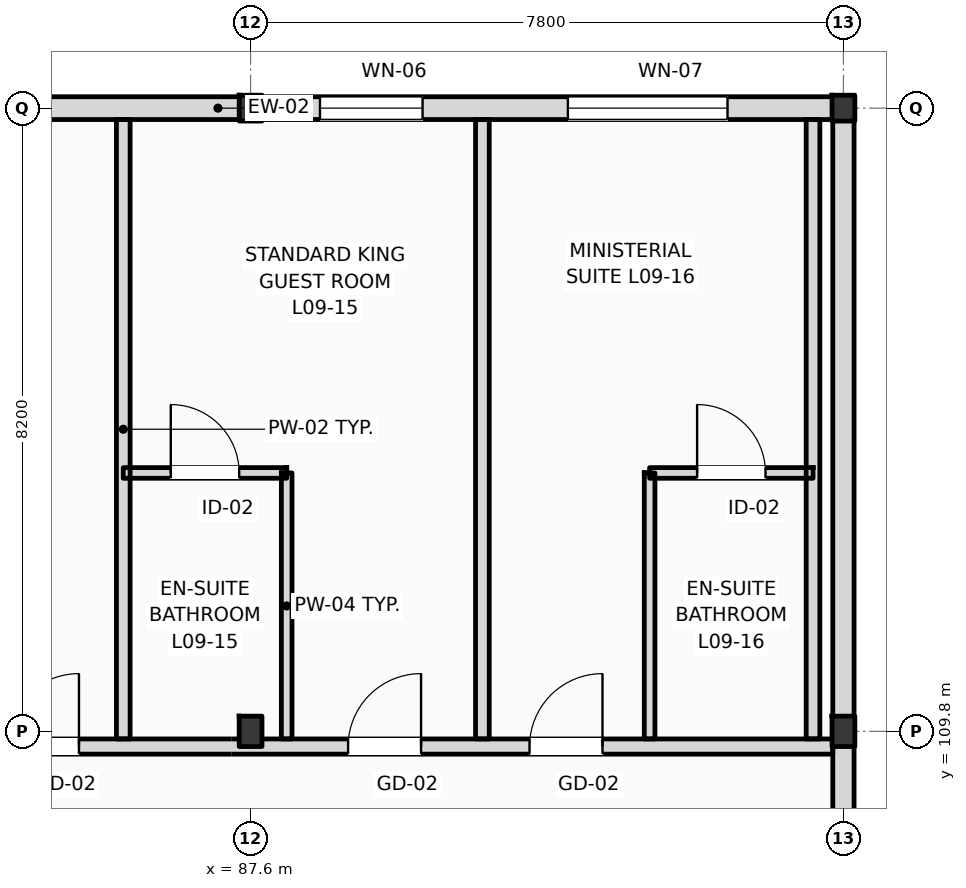
"""IFC4 building model, lengths in metres.
Left out: names, types, materials, properties, quantities, classifications, styles, units other than length and angle.
Written with IfcOpenShell. Run it as: python <this file> out.ifc"""

import sys

from ifc_helpers import new_model, si_unit, direction, frame, frame_2d, origin, origin_2d, place, context, subcontext, project, spatial, rectangle, i_section, extrude, element, fill, save


model = new_model("IFC4")
c1 = context("Model", 3, precision=1e-05, world=origin(), true_north=direction((0.0, 1.0)))
c2 = subcontext(c1, "Body", "Model", "MODEL_VIEW")
j1 = project(units=[si_unit("LENGTHUNIT", "METRE"), si_unit("PLANEANGLEUNIT", "RADIAN")], contexts=[c1])
p1 = place(None, origin())
s1 = spatial("IfcSite", under=j1, at=p1, CompositionType="ELEMENT")
p2 = place(p1, origin())
s2 = spatial("IfcBuilding", under=s1, at=p2, CompositionType="ELEMENT")
p3 = place(p2, frame((0.0, 0.0, 39.0)))
s3 = spatial("IfcBuildingStorey", under=s2, at=p3, CompositionType="ELEMENT", Elevation=39.0)
p4 = place(p3, frame((87.6, 109.8, 0.0), z_axis=(0.0, 0.0, 1.0), x_axis=(1.0, 0.0, 0.0)))
e1 = element("IfcColumn", 1, at=p4, inside=s3, PredefinedType="COLUMN", context=c2, shape_type="SweptSolid", body=[
    extrude(i_section(OverallWidth=0.3, OverallDepth=0.4, WebThickness=0.013, FlangeThickness=0.024, FilletRadius=0.027, at=origin_2d()), origin(), (0.0, 0.0, 1.0), 3.6),
])
p5 = place(p3, frame((87.6, 118.0, 0.0), z_axis=(0.0, 0.0, 1.0), x_axis=(1.0, 0.0, 0.0)))
e2 = element("IfcColumn", 2, at=p5, inside=s3, PredefinedType="COLUMN", context=c2, shape_type="SweptSolid", body=[
    extrude(i_section(OverallWidth=0.3, OverallDepth=0.34, WebThickness=0.012, FlangeThickness=0.021, FilletRadius=0.027, at=origin_2d()), origin(), (0.0, 0.0, 1.0), 3.6),
])
p6 = place(p3, frame((95.4, 109.8, 0.0), z_axis=(0.0, 0.0, 1.0), x_axis=(1.0, 0.0, 0.0)))
e3 = element("IfcColumn", 3, at=p6, inside=s3, PredefinedType="COLUMN", context=c2, shape_type="SweptSolid", body=[
    extrude(i_section(OverallWidth=0.3, OverallDepth=0.4, WebThickness=0.013, FlangeThickness=0.024, FilletRadius=0.027, at=origin_2d()), origin(), (0.0, 0.0, 1.0), 3.6),
])
p7 = place(p3, frame((95.4, 118.0, 0.0), z_axis=(0.0, 0.0, 1.0), x_axis=(1.0, 0.0, 0.0)))
e4 = element("IfcColumn", 4, at=p7, inside=s3, PredefinedType="COLUMN", context=c2, shape_type="SweptSolid", body=[
    extrude(i_section(OverallWidth=0.3, OverallDepth=0.34, WebThickness=0.012, FlangeThickness=0.021, FilletRadius=0.027, at=origin_2d()), origin(), (0.0, 0.0, 1.0), 3.6),
])
p8 = place(p3, frame((22.5, 118.0, 0.0), z_axis=(0.0, 0.0, 1.0), x_axis=(1.0, 0.0, 0.0)))
e5 = element("IfcWall", 5, at=p8, inside=s3, PredefinedType="STANDARD", context=c2, shape_type="SweptSolid", body=[
    extrude(rectangle(XDim=72.9, YDim=0.3, at=frame_2d((36.45, 0.0))), origin(), (0.0, 0.0, 1.0), 2.92),
])
p9 = place(p8, frame((3.6, 0.0, 0.9)))
e6 = element("IfcOpeningElement", 6, at=p9, cuts=e5, PredefinedType="OPENING", context=c2, shape_type="SweptSolid", body=[
    extrude(rectangle(XDim=1.1, YDim=1.6, at=frame_2d((0.55, 0.8))), frame((0.0, 0.16, 0.0), z_axis=(0.0, -1.0, 0.0), x_axis=(1.0, 0.0, 0.0)), (0.0, 0.0, 1.0), 0.32),
])
p10 = place(p8, frame((6.688, 0.0, 0.0)))
e7 = element("IfcOpeningElement", 7, at=p10, cuts=e5, PredefinedType="OPENING", context=c2, shape_type="SweptSolid", body=[
    extrude(rectangle(XDim=1.2, YDim=2.25, at=frame_2d((0.6, 1.125))), frame((0.0, 0.16, 0.0), z_axis=(0.0, -1.0, 0.0), x_axis=(1.0, 0.0, 0.0)), (0.0, 0.0, 1.0), 0.32),
])
p11 = place(p8, frame((11.388, 0.0, 0.9)))
e8 = element("IfcOpeningElement", 8, at=p11, cuts=e5, PredefinedType="OPENING", context=c2, shape_type="SweptSolid", body=[
    extrude(rectangle(XDim=1.6, YDim=1.75, at=frame_2d((0.8, 0.875))), frame((0.0, 0.16, 0.0), z_axis=(0.0, -1.0, 0.0), x_axis=(1.0, 0.0, 0.0)), (0.0, 0.0, 1.0), 0.32),
])
p12 = place(p8, frame((15.413, 0.0, 0.9)))
e9 = element("IfcOpeningElement", 9, at=p12, cuts=e5, PredefinedType="OPENING", context=c2, shape_type="SweptSolid", body=[
    extrude(rectangle(XDim=1.75, YDim=1.84, at=frame_2d((0.875, 0.92))), frame((0.0, 0.16, 0.0), z_axis=(0.0, -1.0, 0.0), x_axis=(1.0, 0.0, 0.0)), (0.0, 0.0, 1.0), 0.32),
])
p13 = place(p8, frame((21.245, 0.0, 0.0)))
e10 = element("IfcOpeningElement", 10, at=p13, cuts=e5, PredefinedType="OPENING", context=c2, shape_type="SweptSolid", body=[
    extrude(rectangle(XDim=1.2, YDim=2.25, at=frame_2d((0.6, 1.125))), frame((0.0, 0.16, 0.0), z_axis=(0.0, -1.0, 0.0), x_axis=(1.0, 0.0, 0.0)), (0.0, 0.0, 1.0), 0.32),
])
p14 = place(p8, frame((23.705, 0.0, 0.0)))
e11 = element("IfcOpeningElement", 11, at=p14, cuts=e5, PredefinedType="OPENING", context=c2, shape_type="SweptSolid", body=[
    extrude(rectangle(XDim=1.2, YDim=2.25, at=frame_2d((0.6, 1.125))), frame((0.0, 0.16, 0.0), z_axis=(0.0, -1.0, 0.0), x_axis=(1.0, 0.0, 0.0)), (0.0, 0.0, 1.0), 0.32),
])
p15 = place(p8, frame((28.488, 0.0, 0.9)))
e12 = element("IfcOpeningElement", 12, at=p15, cuts=e5, PredefinedType="OPENING", context=c2, shape_type="SweptSolid", body=[
    extrude(rectangle(XDim=2.6, YDim=1.84, at=frame_2d((1.3, 0.92))), frame((0.0, 0.16, 0.0), z_axis=(0.0, -1.0, 0.0), x_axis=(1.0, 0.0, 0.0)), (0.0, 0.0, 1.0), 0.32),
])
p16 = place(p8, frame((34.76, 0.0, 0.9)))
e13 = element("IfcOpeningElement", 13, at=p16, cuts=e5, PredefinedType="OPENING", context=c2, shape_type="SweptSolid", body=[
    extrude(rectangle(XDim=1.1, YDim=1.84, at=frame_2d((0.55, 0.92))), frame((0.0, 0.16, 0.0), z_axis=(0.0, -1.0, 0.0), x_axis=(1.0, 0.0, 0.0)), (0.0, 0.0, 1.0), 0.32),
])
p17 = place(p8, frame((38.143, 0.0, 0.0)))
e14 = element("IfcOpeningElement", 14, at=p17, cuts=e5, PredefinedType="OPENING", context=c2, shape_type="SweptSolid", body=[
    extrude(rectangle(XDim=1.2, YDim=2.25, at=frame_2d((0.6, 1.125))), frame((0.0, 0.16, 0.0), z_axis=(0.0, -1.0, 0.0), x_axis=(1.0, 0.0, 0.0)), (0.0, 0.0, 1.0), 0.32),
])
p18 = place(p8, frame((42.687, 0.0, 0.9)))
e15 = element("IfcOpeningElement", 15, at=p18, cuts=e5, PredefinedType="OPENING", context=c2, shape_type="SweptSolid", body=[
    extrude(rectangle(XDim=1.2, YDim=1.8, at=frame_2d((0.6, 0.9))), frame((0.0, 0.16, 0.0), z_axis=(0.0, -1.0, 0.0), x_axis=(1.0, 0.0, 0.0)), (0.0, 0.0, 1.0), 0.32),
])
p19 = place(p8, frame((47.112, 0.0, 0.9)))
e16 = element("IfcOpeningElement", 16, at=p19, cuts=e5, PredefinedType="OPENING", context=c2, shape_type="SweptSolid", body=[
    extrude(rectangle(XDim=1.35, YDim=1.84, at=frame_2d((0.675, 0.92))), frame((0.0, 0.16, 0.0), z_axis=(0.0, -1.0, 0.0), x_axis=(1.0, 0.0, 0.0)), (0.0, 0.0, 1.0), 0.32),
])
p20 = place(p8, frame((52.482, 0.0, 0.0)))
e17 = element("IfcOpeningElement", 17, at=p20, cuts=e5, PredefinedType="OPENING", context=c2, shape_type="SweptSolid", body=[
    extrude(rectangle(XDim=1.2, YDim=2.25, at=frame_2d((0.6, 1.125))), frame((0.0, 0.16, 0.0), z_axis=(0.0, -1.0, 0.0), x_axis=(1.0, 0.0, 0.0)), (0.0, 0.0, 1.0), 0.32),
])
p21 = place(p8, frame((54.942, 0.0, 0.0)))
e18 = element("IfcOpeningElement", 18, at=p21, cuts=e5, PredefinedType="OPENING", context=c2, shape_type="SweptSolid", body=[
    extrude(rectangle(XDim=1.2, YDim=2.25, at=frame_2d((0.6, 1.125))), frame((0.0, 0.16, 0.0), z_axis=(0.0, -1.0, 0.0), x_axis=(1.0, 0.0, 0.0)), (0.0, 0.0, 1.0), 0.32),
])
p22 = place(p8, frame((60.387, 0.0, 0.9)))
e19 = element("IfcOpeningElement", 19, at=p22, cuts=e5, PredefinedType="OPENING", context=c2, shape_type="SweptSolid", body=[
    extrude(rectangle(XDim=1.8, YDim=1.84, at=frame_2d((0.9, 0.92))), frame((0.0, 0.16, 0.0), z_axis=(0.0, -1.0, 0.0), x_axis=(1.0, 0.0, 0.0)), (0.0, 0.0, 1.0), 0.32),
])
p23 = place(p8, frame((66.013, 0.0, 0.9)))
e20 = element("IfcOpeningElement", 20, at=p23, cuts=e5, PredefinedType="OPENING", context=c2, shape_type="SweptSolid", body=[
    extrude(rectangle(XDim=1.35, YDim=1.84, at=frame_2d((0.675, 0.92))), frame((0.0, 0.16, 0.0), z_axis=(0.0, -1.0, 0.0), x_axis=(1.0, 0.0, 0.0)), (0.0, 0.0, 1.0), 0.32),
])
p24 = place(p8, frame((69.275, 0.0, 0.9)))
e21 = element("IfcOpeningElement", 21, at=p24, cuts=e5, PredefinedType="OPENING", context=c2, shape_type="SweptSolid", body=[
    extrude(rectangle(XDim=2.1, YDim=1.84, at=frame_2d((1.05, 0.92))), frame((0.0, 0.16, 0.0), z_axis=(0.0, -1.0, 0.0), x_axis=(1.0, 0.0, 0.0)), (0.0, 0.0, 1.0), 0.32),
])
p25 = place(p3, frame((95.4, 96.0, 0.0), z_axis=(0.0, 0.0, 1.0), x_axis=(0.0, 1.0, 0.0)))
e22 = element("IfcWall", 22, at=p25, inside=s3, PredefinedType="STANDARD", context=c2, shape_type="SweptSolid", body=[
    extrude(rectangle(XDim=22.0, YDim=0.28, at=frame_2d((11.0, 0.0))), origin(), (0.0, 0.0, 1.0), 3.01),
])
p26 = place(p3, frame((10.65, 109.6, 0.0), z_axis=(0.0, 0.0, 1.0), x_axis=(1.0, 0.0, 0.0)))
e23 = element("IfcWall", 23, at=p26, inside=s3, PredefinedType="PARTITIONING", context=c2, shape_type="SweptSolid", body=[
    extrude(rectangle(XDim=84.61, YDim=0.2, at=frame_2d((42.305, 0.0))), origin(), (0.0, 0.0, 1.0), 2.82),
])
p27 = place(p26, frame((15.49, 0.0, 0.0)))
e24 = element("IfcOpeningElement", 24, at=p27, cuts=e23, PredefinedType="OPENING", context=c2, shape_type="SweptSolid", body=[
    extrude(rectangle(XDim=1.02, YDim=2.2, at=frame_2d((0.51, 1.1))), frame((0.0, 0.11, 0.0), z_axis=(0.0, -1.0, 0.0), x_axis=(1.0, 0.0, 0.0)), (0.0, 0.0, 1.0), 0.22),
])
p28 = place(p26, frame((19.703, 0.0, 0.0)))
e25 = element("IfcOpeningElement", 25, at=p28, cuts=e23, PredefinedType="OPENING", context=c2, shape_type="SweptSolid", body=[
    extrude(rectangle(XDim=1.02, YDim=2.2, at=frame_2d((0.51, 1.1))), frame((0.0, 0.11, 0.0), z_axis=(0.0, -1.0, 0.0), x_axis=(1.0, 0.0, 0.0)), (0.0, 0.0, 1.0), 0.22),
])
p29 = place(p26, frame((24.203, 0.0, 0.0)))
e26 = element("IfcOpeningElement", 26, at=p29, cuts=e23, PredefinedType="OPENING", context=c2, shape_type="SweptSolid", body=[
    extrude(rectangle(XDim=1.02, YDim=2.2, at=frame_2d((0.51, 1.1))), frame((0.0, 0.11, 0.0), z_axis=(0.0, -1.0, 0.0), x_axis=(1.0, 0.0, 0.0)), (0.0, 0.0, 1.0), 0.22),
])
p30 = place(p26, frame((26.552, 0.0, 0.0)))
e27 = element("IfcOpeningElement", 27, at=p30, cuts=e23, PredefinedType="OPENING", context=c2, shape_type="SweptSolid", body=[
    extrude(rectangle(XDim=1.02, YDim=2.2, at=frame_2d((0.51, 1.1))), frame((0.0, 0.11, 0.0), z_axis=(0.0, -1.0, 0.0), x_axis=(1.0, 0.0, 0.0)), (0.0, 0.0, 1.0), 0.22),
])
p31 = place(p26, frame((33.233, 0.0, 0.0)))
e28 = element("IfcOpeningElement", 28, at=p31, cuts=e23, PredefinedType="OPENING", context=c2, shape_type="SweptSolid", body=[
    extrude(rectangle(XDim=0.96, YDim=2.2, at=frame_2d((0.48, 1.1))), frame((0.0, 0.11, 0.0), z_axis=(0.0, -1.0, 0.0), x_axis=(1.0, 0.0, 0.0)), (0.0, 0.0, 1.0), 0.22),
])
p32 = place(p26, frame((35.583, 0.0, 0.0)))
e29 = element("IfcOpeningElement", 29, at=p32, cuts=e23, PredefinedType="OPENING", context=c2, shape_type="SweptSolid", body=[
    extrude(rectangle(XDim=0.96, YDim=2.2, at=frame_2d((0.48, 1.1))), frame((0.0, 0.11, 0.0), z_axis=(0.0, -1.0, 0.0), x_axis=(1.0, 0.0, 0.0)), (0.0, 0.0, 1.0), 0.22),
])
p33 = place(p26, frame((42.233, 0.0, 0.0)))
e30 = element("IfcOpeningElement", 30, at=p33, cuts=e23, PredefinedType="OPENING", context=c2, shape_type="SweptSolid", body=[
    extrude(rectangle(XDim=0.96, YDim=2.2, at=frame_2d((0.48, 1.1))), frame((0.0, 0.11, 0.0), z_axis=(0.0, -1.0, 0.0), x_axis=(1.0, 0.0, 0.0)), (0.0, 0.0, 1.0), 0.22),
])
p34 = place(p26, frame((46.983, 0.0, 0.0)))
e31 = element("IfcOpeningElement", 31, at=p34, cuts=e23, PredefinedType="OPENING", context=c2, shape_type="SweptSolid", body=[
    extrude(rectangle(XDim=0.96, YDim=2.2, at=frame_2d((0.48, 1.1))), frame((0.0, 0.11, 0.0), z_axis=(0.0, -1.0, 0.0), x_axis=(1.0, 0.0, 0.0)), (0.0, 0.0, 1.0), 0.22),
])
p35 = place(p26, frame((51.233, 0.0, 0.0)))
e32 = element("IfcOpeningElement", 32, at=p35, cuts=e23, PredefinedType="OPENING", context=c2, shape_type="SweptSolid", body=[
    extrude(rectangle(XDim=0.96, YDim=2.2, at=frame_2d((0.48, 1.1))), frame((0.0, 0.11, 0.0), z_axis=(0.0, -1.0, 0.0), x_axis=(1.0, 0.0, 0.0)), (0.0, 0.0, 1.0), 0.22),
])
p36 = place(p26, frame((55.733, 0.0, 0.0)))
e33 = element("IfcOpeningElement", 33, at=p36, cuts=e23, PredefinedType="OPENING", context=c2, shape_type="SweptSolid", body=[
    extrude(rectangle(XDim=0.96, YDim=2.2, at=frame_2d((0.48, 1.1))), frame((0.0, 0.11, 0.0), z_axis=(0.0, -1.0, 0.0), x_axis=(1.0, 0.0, 0.0)), (0.0, 0.0, 1.0), 0.22),
])
p37 = place(p26, frame((58.083, 0.0, 0.0)))
e34 = element("IfcOpeningElement", 34, at=p37, cuts=e23, PredefinedType="OPENING", context=c2, shape_type="SweptSolid", body=[
    extrude(rectangle(XDim=0.96, YDim=2.2, at=frame_2d((0.48, 1.1))), frame((0.0, 0.11, 0.0), z_axis=(0.0, -1.0, 0.0), x_axis=(1.0, 0.0, 0.0)), (0.0, 0.0, 1.0), 0.22),
])
p38 = place(p26, frame((64.732, 0.0, 0.0)))
e35 = element("IfcOpeningElement", 35, at=p38, cuts=e23, PredefinedType="OPENING", context=c2, shape_type="SweptSolid", body=[
    extrude(rectangle(XDim=0.96, YDim=2.2, at=frame_2d((0.48, 1.1))), frame((0.0, 0.11, 0.0), z_axis=(0.0, -1.0, 0.0), x_axis=(1.0, 0.0, 0.0)), (0.0, 0.0, 1.0), 0.22),
])
p39 = place(p26, frame((66.832, 0.0, 0.0)))
e36 = element("IfcOpeningElement", 36, at=p39, cuts=e23, PredefinedType="OPENING", context=c2, shape_type="SweptSolid", body=[
    extrude(rectangle(XDim=0.96, YDim=2.2, at=frame_2d((0.48, 1.1))), frame((0.0, 0.11, 0.0), z_axis=(0.0, -1.0, 0.0), x_axis=(1.0, 0.0, 0.0)), (0.0, 0.0, 1.0), 0.22),
])
p40 = place(p26, frame((73.732, 0.0, 0.0)))
e37 = element("IfcOpeningElement", 37, at=p40, cuts=e23, PredefinedType="OPENING", context=c2, shape_type="SweptSolid", body=[
    extrude(rectangle(XDim=0.96, YDim=2.2, at=frame_2d((0.48, 1.1))), frame((0.0, 0.11, 0.0), z_axis=(0.0, -1.0, 0.0), x_axis=(1.0, 0.0, 0.0)), (0.0, 0.0, 1.0), 0.22),
])
p41 = place(p26, frame((78.233, 0.0, 0.0)))
e38 = element("IfcOpeningElement", 38, at=p41, cuts=e23, PredefinedType="OPENING", context=c2, shape_type="SweptSolid", body=[
    extrude(rectangle(XDim=0.96, YDim=2.2, at=frame_2d((0.48, 1.1))), frame((0.0, 0.11, 0.0), z_axis=(0.0, -1.0, 0.0), x_axis=(1.0, 0.0, 0.0)), (0.0, 0.0, 1.0), 0.22),
])
p42 = place(p26, frame((80.62, 0.0, 0.0)))
e39 = element("IfcOpeningElement", 39, at=p42, cuts=e23, PredefinedType="OPENING", context=c2, shape_type="SweptSolid", body=[
    extrude(rectangle(XDim=0.96, YDim=2.2, at=frame_2d((0.48, 1.1))), frame((0.0, 0.11, 0.0), z_axis=(0.0, -1.0, 0.0), x_axis=(1.0, 0.0, 0.0)), (0.0, 0.0, 1.0), 0.22),
])
p43 = place(p26, frame((2.716, 0.0, 0.0)))
e40 = element("IfcOpeningElement", 40, at=p43, cuts=e23, PredefinedType="OPENING", context=c2, shape_type="SweptSolid", body=[
    extrude(rectangle(XDim=1.35, YDim=2.25, at=frame_2d((0.675, 1.125))), frame((0.0, 0.11, 0.0), z_axis=(0.0, -1.0, 0.0), x_axis=(1.0, 0.0, 0.0)), (0.0, 0.0, 1.0), 0.22),
])
p44 = place(p26, frame((6.65, 0.0, 0.0)))
e41 = element("IfcOpeningElement", 41, at=p44, cuts=e23, PredefinedType="OPENING", context=c2, shape_type="SweptSolid", body=[
    extrude(rectangle(XDim=1.35, YDim=2.25, at=frame_2d((0.675, 1.125))), frame((0.0, 0.11, 0.0), z_axis=(0.0, -1.0, 0.0), x_axis=(1.0, 0.0, 0.0)), (0.0, 0.0, 1.0), 0.22),
])
p45 = place(p26, frame((10.583, 0.0, 0.0)))
e42 = element("IfcOpeningElement", 42, at=p45, cuts=e23, PredefinedType="OPENING", context=c2, shape_type="SweptSolid", body=[
    extrude(rectangle(XDim=1.35, YDim=2.25, at=frame_2d((0.675, 1.125))), frame((0.0, 0.11, 0.0), z_axis=(0.0, -1.0, 0.0), x_axis=(1.0, 0.0, 0.0)), (0.0, 0.0, 1.0), 0.22),
])
for number, where, z_axis, x_axis in (
    (43, (85.925, 109.7, 0.0), (0.0, 0.0, 1.0), (0.0, 1.0, 0.0)),
    (44, (90.65, 109.7, 0.0), (0.0, 0.0, 1.0), (0.0, 1.0, 0.0)),
):
    element("IfcWall", number, at=place(p3, frame(where, z_axis=z_axis, x_axis=x_axis)), inside=s3, PredefinedType="PARTITIONING", context=c2, shape_type="SweptSolid", body=[
        extrude(rectangle(XDim=8.15, YDim=0.18, at=frame_2d((4.075, 0.0))), origin(), (0.0, 0.0, 1.0), 3.38),
    ])
p46 = place(p3, frame((88.075, 109.7, 0.0), z_axis=(0.0, 0.0, 1.0), x_axis=(0.0, 1.0, 0.0)))
e45 = element("IfcWall", 45, at=p46, inside=s3, PredefinedType="PARTITIONING", context=c2, shape_type="SweptSolid", body=[
    extrude(rectangle(XDim=3.5, YDim=0.14, at=frame_2d((1.75, 0.0))), origin(), (0.0, 0.0, 1.0), 3.38),
])
p47 = place(p3, frame((85.925, 113.2, 0.0), z_axis=(0.0, 0.0, 1.0), x_axis=(1.0, 0.0, 0.0)))
e46 = element("IfcWall", 46, at=p47, inside=s3, PredefinedType="PARTITIONING", context=c2, shape_type="SweptSolid", body=[
    extrude(rectangle(XDim=2.15, YDim=0.14, at=frame_2d((1.075, 0.0))), origin(), (0.0, 0.0, 1.0), 3.38),
])
p48 = place(p47, frame((0.625, 0.0, 0.0)))
e47 = element("IfcOpeningElement", 47, at=p48, cuts=e46, PredefinedType="OPENING", context=c2, shape_type="SweptSolid", body=[
    extrude(rectangle(XDim=0.9, YDim=2.1, at=frame_2d((0.45, 1.05))), frame((0.0, 0.08, 0.0), z_axis=(0.0, -1.0, 0.0), x_axis=(1.0, 0.0, 0.0)), (0.0, 0.0, 1.0), 0.16),
])
p49 = place(p3, frame((95.0, 109.7, 0.0), z_axis=(0.0, 0.0, 1.0), x_axis=(0.0, 1.0, 0.0)))
e48 = element("IfcWall", 48, at=p49, inside=s3, PredefinedType="PARTITIONING", context=c2, shape_type="SweptSolid", body=[
    extrude(rectangle(XDim=8.15, YDim=0.18, at=frame_2d((4.075, 0.0))), origin(), (0.0, 0.0, 1.0), 3.38),
])
p50 = place(p3, frame((92.85, 109.7, 0.0), z_axis=(0.0, 0.0, 1.0), x_axis=(0.0, 1.0, 0.0)))
e49 = element("IfcWall", 49, at=p50, inside=s3, PredefinedType="PARTITIONING", context=c2, shape_type="SweptSolid", body=[
    extrude(rectangle(XDim=3.5, YDim=0.14, at=frame_2d((1.75, 0.0))), origin(), (0.0, 0.0, 1.0), 3.07),
])
p51 = place(p3, frame((92.85, 113.2, 0.0), z_axis=(0.0, 0.0, 1.0), x_axis=(1.0, 0.0, 0.0)))
e50 = element("IfcWall", 50, at=p51, inside=s3, PredefinedType="PARTITIONING", context=c2, shape_type="SweptSolid", body=[
    extrude(rectangle(XDim=2.15, YDim=0.14, at=frame_2d((1.075, 0.0))), origin(), (0.0, 0.0, 1.0), 3.38),
])
p52 = place(p51, frame((0.625, 0.0, 0.0)))
e51 = element("IfcOpeningElement", 51, at=p52, cuts=e50, PredefinedType="OPENING", context=c2, shape_type="SweptSolid", body=[
    extrude(rectangle(XDim=0.9, YDim=2.1, at=frame_2d((0.45, 1.05))), frame((0.0, 0.08, 0.0), z_axis=(0.0, -1.0, 0.0), x_axis=(1.0, 0.0, 0.0)), (0.0, 0.0, 1.0), 0.16),
])
p53 = place(p23, origin())
e52 = element("IfcWindow", 52, at=p53, inside=s3, PartitioningType="DOUBLE_PANEL_VERTICAL", PredefinedType="WINDOW", context=c2, shape_type="SweptSolid", body=[
    extrude(rectangle(XDim=1.35, YDim=1.84, at=frame_2d((0.675, 0.92))), frame((0.0, 0.03, 0.0), z_axis=(0.0, -1.0, 0.0), x_axis=(1.0, 0.0, 0.0)), (0.0, 0.0, 1.0), 0.06),
])
fill(e20, e52)
p54 = place(p24, origin())
e53 = element("IfcWindow", 53, at=p54, inside=s3, PartitioningType="DOUBLE_PANEL_VERTICAL", PredefinedType="WINDOW", context=c2, shape_type="SweptSolid", body=[
    extrude(rectangle(XDim=2.1, YDim=1.84, at=frame_2d((1.05, 0.92))), frame((0.0, 0.03, 0.0), z_axis=(0.0, -1.0, 0.0), x_axis=(1.0, 0.0, 0.0)), (0.0, 0.0, 1.0), 0.06),
])
fill(e21, e53)
p55 = place(p40, origin())
e54 = element("IfcDoor", 54, at=p55, inside=s3, OperationType="SINGLE_SWING_RIGHT", PredefinedType="DOOR", context=c2, shape_type="SweptSolid", body=[
    extrude(rectangle(XDim=0.96, YDim=2.2, at=frame_2d((0.48, 1.1))), frame((0.0, 0.025, 0.0), z_axis=(0.0, -1.0, 0.0), x_axis=(1.0, 0.0, 0.0)), (0.0, 0.0, 1.0), 0.05),
])
fill(e37, e54)
p56 = place(p41, origin())
e55 = element("IfcDoor", 55, at=p56, inside=s3, OperationType="SINGLE_SWING_RIGHT", PredefinedType="DOOR", context=c2, shape_type="SweptSolid", body=[
    extrude(rectangle(XDim=0.96, YDim=2.2, at=frame_2d((0.48, 1.1))), frame((0.0, 0.025, 0.0), z_axis=(0.0, -1.0, 0.0), x_axis=(1.0, 0.0, 0.0)), (0.0, 0.0, 1.0), 0.05),
])
fill(e38, e55)
p57 = place(p48, origin())
e56 = element("IfcDoor", 56, at=p57, inside=s3, OperationType="SINGLE_SWING_LEFT", PredefinedType="DOOR", context=c2, shape_type="SweptSolid", body=[
    extrude(rectangle(XDim=0.9, YDim=2.1, at=frame_2d((0.45, 1.05))), frame((0.0, 0.025, 0.0), z_axis=(0.0, -1.0, 0.0), x_axis=(1.0, 0.0, 0.0)), (0.0, 0.0, 1.0), 0.05),
])
fill(e47, e56)
p58 = place(p42, origin())
e57 = element("IfcDoor", 57, at=p58, inside=s3, OperationType="SINGLE_SWING_RIGHT", PredefinedType="DOOR", context=c2, shape_type="SweptSolid", body=[
    extrude(rectangle(XDim=0.96, YDim=2.2, at=frame_2d((0.48, 1.1))), frame((0.0, 0.025, 0.0), z_axis=(0.0, -1.0, 0.0), x_axis=(1.0, 0.0, 0.0)), (0.0, 0.0, 1.0), 0.05),
])
fill(e39, e57)
p59 = place(p52, origin())
e58 = element("IfcDoor", 58, at=p59, inside=s3, OperationType="SINGLE_SWING_LEFT", PredefinedType="DOOR", context=c2, shape_type="SweptSolid", body=[
    extrude(rectangle(XDim=0.9, YDim=2.1, at=frame_2d((0.45, 1.05))), frame((0.0, 0.025, 0.0), z_axis=(0.0, -1.0, 0.0), x_axis=(1.0, 0.0, 0.0)), (0.0, 0.0, 1.0), 0.05),
])
fill(e51, e58)
save(model, sys.argv[1])
